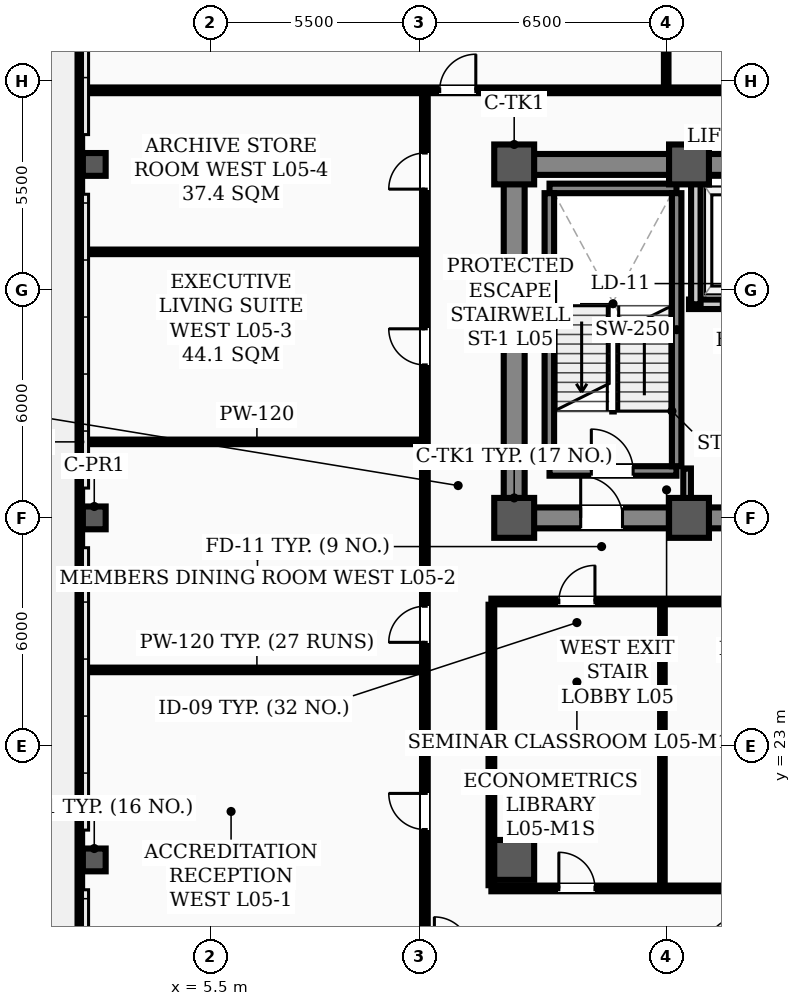
"""IFC4 building model, lengths in metres.
Left out: names, types, materials, properties, quantities, classifications, styles, units other than length and angle.
Written with IfcOpenShell. Run it as: python <this file> out.ifc"""

import sys

from ifc_helpers import new_model, si_unit, direction, frame, frame_2d, origin, origin_2d, place, context, subcontext, project, spatial, rectangle, hollow_rectangle, extrude, element, fill, save


model = new_model("IFC4")
c1 = context("Model", 3, precision=1e-05, world=origin(), true_north=direction((0.0, 1.0)))
c2 = subcontext(c1, "Body", "Model", "MODEL_VIEW")
j1 = project(units=[si_unit("LENGTHUNIT", "METRE"), si_unit("PLANEANGLEUNIT", "RADIAN")], contexts=[c1])
p1 = place(None, origin())
s1 = spatial("IfcSite", under=j1, at=p1, CompositionType="ELEMENT")
p2 = place(p1, origin())
s2 = spatial("IfcBuilding", under=s1, at=p2, CompositionType="ELEMENT")
p3 = place(p2, frame((0.0, 0.0, 22.0)))
s3 = spatial("IfcBuildingStorey", under=s2, at=p3, CompositionType="ELEMENT", Elevation=22.0)
for number, where, z_axis, x_axis in (
    (1, (13.5, 29.0, 0.0), (0.0, 0.0, 1.0), (1.0, 0.0, 0.0)),
    (2, (13.5, 38.3, 0.0), (0.0, 0.0, 1.0), (1.0, 0.0, 0.0)),
    (3, (18.1, 29.0, 0.0), (0.0, 0.0, 1.0), (1.0, 0.0, 0.0)),
    (4, (18.1, 38.3, 0.0), (0.0, 0.0, 1.0), (1.0, 0.0, 0.0)),
    (5, (13.5, 20.0, 0.0), (0.0, 0.0, 1.0), (1.0, 0.0, 0.0)),
):
    element("IfcColumn", number, at=place(p3, frame(where, z_axis=z_axis, x_axis=x_axis)), inside=s3, PredefinedType="COLUMN", context=c2, shape_type="SweptSolid", body=[
        extrude(hollow_rectangle(XDim=1.05, YDim=1.05, WallThickness=0.038, InnerFilletRadius=0.019, OuterFilletRadius=0.057, at=origin_2d()), origin(), (0.0, 0.0, 1.0), 4.5),
    ])
for number, where, z_axis, x_axis in (
    (6, (2.45, 20.0, 0.0), (0.0, 0.0, 1.0), (1.0, 0.0, 0.0)),
    (7, (2.45, 29.0, 0.0), (0.0, 0.0, 1.0), (1.0, 0.0, 0.0)),
    (8, (2.45, 38.3, 0.0), (0.0, 0.0, 1.0), (1.0, 0.0, 0.0)),
):
    element("IfcColumn", number, at=place(p3, frame(where, z_axis=z_axis, x_axis=x_axis)), inside=s3, PredefinedType="COLUMN", context=c2, shape_type="SweptSolid", body=[
        extrude(hollow_rectangle(XDim=0.6, YDim=0.6, WallThickness=0.026, InnerFilletRadius=0.013, OuterFilletRadius=0.039, at=origin_2d()), origin(), (0.0, 0.0, 1.0), 4.5),
    ])
p4 = place(p3, frame((2.07, 17.45, 0.0), z_axis=(0.0, 0.0, 1.0), x_axis=(0.0, 1.0, 0.0)))
e9 = element("IfcWall", 9, at=p4, inside=s3, PredefinedType="PARAPET", context=c2, shape_type="SweptSolid", body=[
    extrude(rectangle(XDim=27.1, YDim=0.12, at=frame_2d((13.55, 0.0))), origin(), (0.0, 0.0, 1.0), 1.2),
])
p5 = place(p3, frame((13.5, 29.0, 0.0), z_axis=(0.0, 0.0, 1.0), x_axis=(1.0, 0.0, 0.0)))
e10 = element("IfcWall", 10, at=p5, inside=s3, PredefinedType="SHEAR", context=c2, shape_type="SweptSolid", body=[
    extrude(rectangle(XDim=30.5, YDim=0.55, at=frame_2d((15.25, 0.0))), origin(), (0.0, 0.0, 1.0), 4.32),
])
p6 = place(p5, frame((1.75, 0.0, 0.0)))
e11 = element("IfcOpeningElement", 11, at=p6, cuts=e10, PredefinedType="OPENING", context=c2, shape_type="SweptSolid", body=[
    extrude(rectangle(XDim=1.1, YDim=2.08, at=frame_2d((0.55, 1.04))), frame((0.0, 0.285, 0.0), z_axis=(0.0, -1.0, 0.0), x_axis=(1.0, 0.0, 0.0)), (0.0, 0.0, 1.0), 0.57),
])
p7 = place(p5, frame((26.7, 0.0, 0.0)))
e12 = element("IfcOpeningElement", 12, at=p7, cuts=e10, PredefinedType="OPENING", context=c2, shape_type="SweptSolid", body=[
    extrude(rectangle(XDim=1.1, YDim=2.08, at=frame_2d((0.55, 1.04))), frame((0.0, 0.285, 0.0), z_axis=(0.0, -1.0, 0.0), x_axis=(1.0, 0.0, 0.0)), (0.0, 0.0, 1.0), 0.57),
])
p8 = place(p5, frame((6.8, 0.0, 0.0)))
e13 = element("IfcOpeningElement", 13, at=p8, cuts=e10, PredefinedType="OPENING", context=c2, shape_type="SweptSolid", body=[
    extrude(rectangle(XDim=1.1, YDim=2.08, at=frame_2d((0.55, 1.04))), frame((0.0, 0.285, 0.0), z_axis=(0.0, -1.0, 0.0), x_axis=(1.0, 0.0, 0.0)), (0.0, 0.0, 1.0), 0.57),
])
p9 = place(p5, frame((13.2, 0.0, 0.0)))
e14 = element("IfcOpeningElement", 14, at=p9, cuts=e10, PredefinedType="OPENING", context=c2, shape_type="SweptSolid", body=[
    extrude(rectangle(XDim=1.6, YDim=2.08, at=frame_2d((0.8, 1.04))), frame((0.0, 0.285, 0.0), z_axis=(0.0, -1.0, 0.0), x_axis=(1.0, 0.0, 0.0)), (0.0, 0.0, 1.0), 0.57),
])
p10 = place(p5, frame((19.5, 0.0, 0.0)))
e15 = element("IfcOpeningElement", 15, at=p10, cuts=e10, PredefinedType="OPENING", context=c2, shape_type="SweptSolid", body=[
    extrude(rectangle(XDim=0.9, YDim=2.08, at=frame_2d((0.45, 1.04))), frame((0.0, 0.285, 0.0), z_axis=(0.0, -1.0, 0.0), x_axis=(1.0, 0.0, 0.0)), (0.0, 0.0, 1.0), 0.57),
])
p11 = place(p5, frame((21.55, 0.0, 0.0)))
e16 = element("IfcOpeningElement", 16, at=p11, cuts=e10, PredefinedType="OPENING", context=c2, shape_type="SweptSolid", body=[
    extrude(rectangle(XDim=0.9, YDim=2.08, at=frame_2d((0.45, 1.04))), frame((0.0, 0.285, 0.0), z_axis=(0.0, -1.0, 0.0), x_axis=(1.0, 0.0, 0.0)), (0.0, 0.0, 1.0), 0.57),
])
p12 = place(p3, frame((13.5, 38.3, 0.0), z_axis=(0.0, 0.0, 1.0), x_axis=(1.0, 0.0, 0.0)))
e17 = element("IfcWall", 17, at=p12, inside=s3, PredefinedType="SHEAR", context=c2, shape_type="SweptSolid", body=[
    extrude(rectangle(XDim=30.5, YDim=0.55, at=frame_2d((15.25, 0.0))), origin(), (0.0, 0.0, 1.0), 4.32),
])
p13 = place(p3, frame((13.5, 29.35, 0.0), z_axis=(0.0, 0.0, 1.0), x_axis=(0.0, 1.0, 0.0)))
e18 = element("IfcWall", 18, at=p13, inside=s3, PredefinedType="SHEAR", context=c2, shape_type="SweptSolid", body=[
    extrude(rectangle(XDim=8.6, YDim=0.55, at=frame_2d((4.3, 0.0))), origin(), (0.0, 0.0, 1.0), 4.32),
])
p14 = place(p3, frame((14.43, 30.235, 0.0), z_axis=(0.0, 0.0, 1.0), x_axis=(1.0, 0.0, 0.0)))
e19 = element("IfcWall", 19, at=p14, inside=s3, PredefinedType="STANDARD", context=c2, shape_type="SweptSolid", body=[
    extrude(rectangle(XDim=3.34, YDim=0.25, at=frame_2d((1.67, 0.0))), origin(), (0.0, 0.0, 1.0), 4.32),
])
p15 = place(p14, frame((1.1, 0.0, 0.0)))
e20 = element("IfcOpeningElement", 20, at=p15, cuts=e19, PredefinedType="OPENING", context=c2, shape_type="SweptSolid", body=[
    extrude(rectangle(XDim=1.1, YDim=2.08, at=frame_2d((0.55, 1.04))), frame((0.0, 0.135, 0.0), z_axis=(0.0, -1.0, 0.0), x_axis=(1.0, 0.0, 0.0)), (0.0, 0.0, 1.0), 0.27),
])
p16 = place(p3, frame((14.43, 37.669, 0.0), z_axis=(0.0, 0.0, 1.0), x_axis=(1.0, 0.0, 0.0)))
e21 = element("IfcWall", 21, at=p16, inside=s3, PredefinedType="STANDARD", context=c2, shape_type="SweptSolid", body=[
    extrude(rectangle(XDim=3.34, YDim=0.25, at=frame_2d((1.67, 0.0))), origin(), (0.0, 0.0, 1.0), 4.32),
])
for number, where, z_axis, x_axis in (
    (22, (14.425, 30.36, 0.0), (0.0, 0.0, 1.0), (0.0, 1.0, 0.0)),
    (23, (17.775, 30.36, 0.0), (0.0, 0.0, 1.0), (0.0, 1.0, 0.0)),
):
    element("IfcWall", number, at=place(p3, frame(where, z_axis=z_axis, x_axis=x_axis)), inside=s3, PredefinedType="STANDARD", context=c2, shape_type="SweptSolid", body=[
        extrude(rectangle(XDim=7.184, YDim=0.25, at=frame_2d((3.592, 0.0))), origin(), (0.0, 0.0, 1.0), 4.32),
    ])
p17 = place(p3, frame((18.1, 34.62, 0.0), z_axis=(0.0, 0.0, 1.0), x_axis=(1.0, 0.0, 0.0)))
e24 = element("IfcWall", 24, at=p17, inside=s3, PredefinedType="STANDARD", context=c2, shape_type="SweptSolid", body=[
    extrude(rectangle(XDim=5.35, YDim=0.25, at=frame_2d((2.675, 0.0))), origin(), (0.0, 0.0, 1.0), 4.32),
])
p18 = place(p17, frame((0.85, 0.0, 0.0)))
e25 = element("IfcOpeningElement", 25, at=p18, cuts=e24, PredefinedType="OPENING", context=c2, shape_type="SweptSolid", body=[
    extrude(rectangle(XDim=1.1, YDim=2.08, at=frame_2d((0.55, 1.04))), frame((0.0, 0.135, 0.0), z_axis=(0.0, -1.0, 0.0), x_axis=(1.0, 0.0, 0.0)), (0.0, 0.0, 1.0), 0.27),
])
p19 = place(p17, frame((3.45, 0.0, 0.0)))
e26 = element("IfcOpeningElement", 26, at=p19, cuts=e24, PredefinedType="OPENING", context=c2, shape_type="SweptSolid", body=[
    extrude(rectangle(XDim=1.1, YDim=2.08, at=frame_2d((0.55, 1.04))), frame((0.0, 0.135, 0.0), z_axis=(0.0, -1.0, 0.0), x_axis=(1.0, 0.0, 0.0)), (0.0, 0.0, 1.0), 0.27),
])
p20 = place(p3, frame((18.28, 34.62, 0.0), z_axis=(0.0, 0.0, 1.0), x_axis=(0.0, 1.0, 0.0)))
e27 = element("IfcWall", 27, at=p20, inside=s3, PredefinedType="STANDARD", context=c2, shape_type="SweptSolid", body=[
    extrude(rectangle(XDim=3.33, YDim=0.25, at=frame_2d((1.665, 0.0))), origin(), (0.0, 0.0, 1.0), 3.9),
])
p21 = place(p3, frame((12.9, 26.8, 0.0), z_axis=(0.0, 0.0, 1.0), x_axis=(1.0, 0.0, 0.0)))
e28 = element("IfcWall", 28, at=p21, inside=s3, PredefinedType="PARTITIONING", context=c2, shape_type="SweptSolid", body=[
    extrude(rectangle(XDim=31.7, YDim=0.15, at=frame_2d((15.85, 0.0))), origin(), (0.0, 0.0, 1.0), 3.7),
])
p22 = place(p21, frame((13.6, 0.0, 0.0)))
e29 = element("IfcOpeningElement", 29, at=p22, cuts=e28, PredefinedType="OPENING", context=c2, shape_type="SweptSolid", body=[
    extrude(rectangle(XDim=1.6, YDim=2.08, at=frame_2d((0.8, 1.04))), frame((0.0, 0.085, 0.0), z_axis=(0.0, -1.0, 0.0), x_axis=(1.0, 0.0, 0.0)), (0.0, 0.0, 1.0), 0.17),
])
p23 = place(p21, frame((1.775, 0.0, 0.0)))
e30 = element("IfcOpeningElement", 30, at=p23, cuts=e28, PredefinedType="OPENING", context=c2, shape_type="SweptSolid", body=[
    extrude(rectangle(XDim=0.95, YDim=2.08, at=frame_2d((0.475, 1.04))), frame((0.0, 0.085, 0.0), z_axis=(0.0, -1.0, 0.0), x_axis=(1.0, 0.0, 0.0)), (0.0, 0.0, 1.0), 0.17),
])
p24 = place(p21, frame((6.225, 0.0, 0.0)))
e31 = element("IfcOpeningElement", 31, at=p24, cuts=e28, PredefinedType="OPENING", context=c2, shape_type="SweptSolid", body=[
    extrude(rectangle(XDim=0.95, YDim=2.08, at=frame_2d((0.475, 1.04))), frame((0.0, 0.085, 0.0), z_axis=(0.0, -1.0, 0.0), x_axis=(1.0, 0.0, 0.0)), (0.0, 0.0, 1.0), 0.17),
])
p25 = place(p21, frame((10.625, 0.0, 0.0)))
e32 = element("IfcOpeningElement", 32, at=p25, cuts=e28, PredefinedType="OPENING", context=c2, shape_type="SweptSolid", body=[
    extrude(rectangle(XDim=0.95, YDim=2.08, at=frame_2d((0.475, 1.04))), frame((0.0, 0.085, 0.0), z_axis=(0.0, -1.0, 0.0), x_axis=(1.0, 0.0, 0.0)), (0.0, 0.0, 1.0), 0.17),
])
p26 = place(p21, frame((16.075, 0.0, 0.0)))
e33 = element("IfcOpeningElement", 33, at=p26, cuts=e28, PredefinedType="OPENING", context=c2, shape_type="SweptSolid", body=[
    extrude(rectangle(XDim=0.95, YDim=2.08, at=frame_2d((0.475, 1.04))), frame((0.0, 0.085, 0.0), z_axis=(0.0, -1.0, 0.0), x_axis=(1.0, 0.0, 0.0)), (0.0, 0.0, 1.0), 0.17),
])
p27 = place(p21, frame((21.925, 0.0, 0.0)))
e34 = element("IfcOpeningElement", 34, at=p27, cuts=e28, PredefinedType="OPENING", context=c2, shape_type="SweptSolid", body=[
    extrude(rectangle(XDim=0.95, YDim=2.08, at=frame_2d((0.475, 1.04))), frame((0.0, 0.085, 0.0), z_axis=(0.0, -1.0, 0.0), x_axis=(1.0, 0.0, 0.0)), (0.0, 0.0, 1.0), 0.17),
])
p28 = place(p21, frame((28.625, 0.0, 0.0)))
e35 = element("IfcOpeningElement", 35, at=p28, cuts=e28, PredefinedType="OPENING", context=c2, shape_type="SweptSolid", body=[
    extrude(rectangle(XDim=0.95, YDim=2.08, at=frame_2d((0.475, 1.04))), frame((0.0, 0.085, 0.0), z_axis=(0.0, -1.0, 0.0), x_axis=(1.0, 0.0, 0.0)), (0.0, 0.0, 1.0), 0.17),
])
p29 = place(p3, frame((12.9, 19.25, 0.0), z_axis=(0.0, 0.0, 1.0), x_axis=(1.0, 0.0, 0.0)))
e36 = element("IfcWall", 36, at=p29, inside=s3, PredefinedType="PARTITIONING", context=c2, shape_type="SweptSolid", body=[
    extrude(rectangle(XDim=13.3, YDim=0.15, at=frame_2d((6.65, 0.0))), origin(), (0.0, 0.0, 1.0), 3.7),
])
p30 = place(p29, frame((1.775, 0.0, 0.0)))
e37 = element("IfcOpeningElement", 37, at=p30, cuts=e36, PredefinedType="OPENING", context=c2, shape_type="SweptSolid", body=[
    extrude(rectangle(XDim=0.95, YDim=2.08, at=frame_2d((0.475, 1.04))), frame((0.0, 0.085, 0.0), z_axis=(0.0, -1.0, 0.0), x_axis=(1.0, 0.0, 0.0)), (0.0, 0.0, 1.0), 0.17),
])
p31 = place(p29, frame((6.225, 0.0, 0.0)))
e38 = element("IfcOpeningElement", 38, at=p31, cuts=e36, PredefinedType="OPENING", context=c2, shape_type="SweptSolid", body=[
    extrude(rectangle(XDim=0.95, YDim=2.08, at=frame_2d((0.475, 1.04))), frame((0.0, 0.085, 0.0), z_axis=(0.0, -1.0, 0.0), x_axis=(1.0, 0.0, 0.0)), (0.0, 0.0, 1.0), 0.17),
])
p32 = place(p29, frame((12.175, 0.0, 0.0)))
e39 = element("IfcOpeningElement", 39, at=p32, cuts=e36, PredefinedType="OPENING", context=c2, shape_type="SweptSolid", body=[
    extrude(rectangle(XDim=0.95, YDim=2.08, at=frame_2d((0.475, 1.04))), frame((0.0, 0.085, 0.0), z_axis=(0.0, -1.0, 0.0), x_axis=(1.0, 0.0, 0.0)), (0.0, 0.0, 1.0), 0.17),
])
p33 = place(p3, frame((12.9, 23.0, 0.0), z_axis=(0.0, 0.0, 1.0), x_axis=(1.0, 0.0, 0.0)))
e40 = element("IfcWall", 40, at=p33, inside=s3, PredefinedType="PARTITIONING", context=c2, shape_type="SweptSolid", body=[
    extrude(rectangle(XDim=4.5, YDim=0.12, at=frame_2d((2.25, 0.0))), origin(), (0.0, 0.0, 1.0), 3.7),
])
p34 = place(p3, frame((17.4, 23.0, 0.0), z_axis=(0.0, 0.0, 1.0), x_axis=(1.0, 0.0, 0.0)))
e41 = element("IfcWall", 41, at=p34, inside=s3, PredefinedType="PARTITIONING", context=c2, shape_type="SweptSolid", body=[
    extrude(rectangle(XDim=4.4, YDim=0.12, at=frame_2d((2.2, 0.0))), origin(), (0.0, 0.0, 1.0), 3.9),
])
for number, where, z_axis, x_axis in (
    (42, (2.31, 25.0, 0.0), (0.0, 0.0, 1.0), (1.0, 0.0, 0.0)),
    (43, (2.31, 31.0, 0.0), (0.0, 0.0, 1.0), (1.0, 0.0, 0.0)),
    (44, (2.31, 36.0, 0.0), (0.0, 0.0, 1.0), (1.0, 0.0, 0.0)),
):
    element("IfcWall", number, at=place(p3, frame(where, z_axis=z_axis, x_axis=x_axis)), inside=s3, PredefinedType="PARTITIONING", context=c2, shape_type="SweptSolid", body=[
        extrude(rectangle(XDim=8.84, YDim=0.12, at=frame_2d((4.42, 0.0))), origin(), (0.0, 0.0, 1.0), 3.812),
    ])
p35 = place(p3, frame((2.31, 40.25, 0.0), z_axis=(0.0, 0.0, 1.0), x_axis=(1.0, 0.0, 0.0)))
e45 = element("IfcWall", 45, at=p35, inside=s3, PredefinedType="PARTITIONING", context=c2, shape_type="SweptSolid", body=[
    extrude(rectangle(XDim=49.38, YDim=0.15, at=frame_2d((24.69, 0.0))), origin(), (0.0, 0.0, 1.0), 3.7),
])
p36 = place(p35, frame((9.23, 0.0, 0.0)))
e46 = element("IfcOpeningElement", 46, at=p36, cuts=e45, PredefinedType="OPENING", context=c2, shape_type="SweptSolid", body=[
    extrude(rectangle(XDim=0.95, YDim=2.08, at=frame_2d((0.475, 1.04))), frame((0.0, 0.085, 0.0), z_axis=(0.0, -1.0, 0.0), x_axis=(1.0, 0.0, 0.0)), (0.0, 0.0, 1.0), 0.17),
])
p37 = place(p35, frame((18.715, 0.0, 0.0)))
e47 = element("IfcOpeningElement", 47, at=p37, cuts=e45, PredefinedType="OPENING", context=c2, shape_type="SweptSolid", body=[
    extrude(rectangle(XDim=0.95, YDim=2.08, at=frame_2d((0.475, 1.04))), frame((0.0, 0.085, 0.0), z_axis=(0.0, -1.0, 0.0), x_axis=(1.0, 0.0, 0.0)), (0.0, 0.0, 1.0), 0.17),
])
p38 = place(p35, frame((26.715, 0.0, 0.0)))
e48 = element("IfcOpeningElement", 48, at=p38, cuts=e45, PredefinedType="OPENING", context=c2, shape_type="SweptSolid", body=[
    extrude(rectangle(XDim=0.95, YDim=2.08, at=frame_2d((0.475, 1.04))), frame((0.0, 0.085, 0.0), z_axis=(0.0, -1.0, 0.0), x_axis=(1.0, 0.0, 0.0)), (0.0, 0.0, 1.0), 0.17),
])
p39 = place(p35, frame((31.765, 0.0, 0.0)))
e49 = element("IfcOpeningElement", 49, at=p39, cuts=e45, PredefinedType="OPENING", context=c2, shape_type="SweptSolid", body=[
    extrude(rectangle(XDim=0.95, YDim=2.08, at=frame_2d((0.475, 1.04))), frame((0.0, 0.085, 0.0), z_axis=(0.0, -1.0, 0.0), x_axis=(1.0, 0.0, 0.0)), (0.0, 0.0, 1.0), 0.17),
])
p40 = place(p35, frame((42.7, 0.0, 0.0)))
e50 = element("IfcOpeningElement", 50, at=p40, cuts=e45, PredefinedType="OPENING", context=c2, shape_type="SweptSolid", body=[
    extrude(rectangle(XDim=0.95, YDim=2.08, at=frame_2d((0.475, 1.04))), frame((0.0, 0.085, 0.0), z_axis=(0.0, -1.0, 0.0), x_axis=(1.0, 0.0, 0.0)), (0.0, 0.0, 1.0), 0.17),
])
p41 = place(p3, frame((18.05, 29.285, 0.0), z_axis=(0.0, 0.0, 1.0), x_axis=(0.0, 1.0, 0.0)))
e51 = element("IfcWall", 51, at=p41, inside=s3, PredefinedType="STANDARD", context=c2, shape_type="SweptSolid", body=[
    extrude(rectangle(XDim=1.015, YDim=0.2, at=frame_2d((0.508, 0.0))), origin(), (0.0, 0.0, 1.0), 3.9),
])
p42 = place(p3, frame((11.15, 17.635, 0.0), z_axis=(0.0, 0.0, 1.0), x_axis=(0.0, 1.0, 0.0)))
e52 = element("IfcWall", 52, at=p42, inside=s3, PredefinedType="PARTITIONING", context=c2, shape_type="SweptSolid", body=[
    extrude(rectangle(XDim=22.53, YDim=0.15, at=frame_2d((11.265, 0.0))), origin(), (0.0, 0.0, 1.0), 3.6),
])
p43 = place(p42, frame((3.165, 0.0, 0.0)))
e53 = element("IfcOpeningElement", 53, at=p43, cuts=e52, PredefinedType="OPENING", context=c2, shape_type="SweptSolid", body=[
    extrude(rectangle(XDim=0.95, YDim=2.08, at=frame_2d((0.475, 1.04))), frame((0.0, 0.085, 0.0), z_axis=(0.0, -1.0, 0.0), x_axis=(1.0, 0.0, 0.0)), (0.0, 0.0, 1.0), 0.17),
])
p44 = place(p42, frame((8.09, 0.0, 0.0)))
e54 = element("IfcOpeningElement", 54, at=p44, cuts=e52, PredefinedType="OPENING", context=c2, shape_type="SweptSolid", body=[
    extrude(rectangle(XDim=0.95, YDim=2.08, at=frame_2d((0.475, 1.04))), frame((0.0, 0.085, 0.0), z_axis=(0.0, -1.0, 0.0), x_axis=(1.0, 0.0, 0.0)), (0.0, 0.0, 1.0), 0.17),
])
p45 = place(p42, frame((15.39, 0.0, 0.0)))
e55 = element("IfcOpeningElement", 55, at=p45, cuts=e52, PredefinedType="OPENING", context=c2, shape_type="SweptSolid", body=[
    extrude(rectangle(XDim=0.95, YDim=2.08, at=frame_2d((0.475, 1.04))), frame((0.0, 0.085, 0.0), z_axis=(0.0, -1.0, 0.0), x_axis=(1.0, 0.0, 0.0)), (0.0, 0.0, 1.0), 0.17),
])
p46 = place(p42, frame((20.015, 0.0, 0.0)))
e56 = element("IfcOpeningElement", 56, at=p46, cuts=e52, PredefinedType="OPENING", context=c2, shape_type="SweptSolid", body=[
    extrude(rectangle(XDim=0.95, YDim=2.08, at=frame_2d((0.475, 1.04))), frame((0.0, 0.085, 0.0), z_axis=(0.0, -1.0, 0.0), x_axis=(1.0, 0.0, 0.0)), (0.0, 0.0, 1.0), 0.17),
])
p47 = place(p3, frame((12.9, 19.335, 0.0), z_axis=(0.0, 0.0, 1.0), x_axis=(0.0, 1.0, 0.0)))
e57 = element("IfcWall", 57, at=p47, inside=s3, PredefinedType="PARTITIONING", context=c2, shape_type="SweptSolid", body=[
    extrude(rectangle(XDim=7.38, YDim=0.15, at=frame_2d((3.69, 0.0))), origin(), (0.0, 0.0, 1.0), 3.6),
])
p48 = place(p3, frame((17.4, 19.335, 0.0), z_axis=(0.0, 0.0, 1.0), x_axis=(0.0, 1.0, 0.0)))
e58 = element("IfcWall", 58, at=p48, inside=s3, PredefinedType="PARTITIONING", context=c2, shape_type="SweptSolid", body=[
    extrude(rectangle(XDim=7.38, YDim=0.12, at=frame_2d((3.69, 0.0))), origin(), (0.0, 0.0, 1.0), 3.6),
])
p49 = place(p3, frame((17.5, 40.335, 0.0), z_axis=(0.0, 0.0, 1.0), x_axis=(0.0, 1.0, 0.0)))
e59 = element("IfcWall", 59, at=p49, inside=s3, PredefinedType="PARTITIONING", context=c2, shape_type="SweptSolid", body=[
    extrude(rectangle(XDim=6.355, YDim=0.12, at=frame_2d((3.177, 0.0))), origin(), (0.0, 0.0, 1.0), 3.812),
])
p50 = place(p15, origin())
e60 = element("IfcDoor", 60, at=p50, inside=s3, OperationType="SINGLE_SWING_LEFT", PredefinedType="DOOR", context=c2, shape_type="SweptSolid", body=[
    extrude(rectangle(XDim=1.1, YDim=2.08, at=frame_2d((0.55, 1.04))), frame((0.0, 0.025, 0.0), z_axis=(0.0, -1.0, 0.0), x_axis=(1.0, 0.0, 0.0)), (0.0, 0.0, 1.0), 0.05),
])
fill(e20, e60)
p51 = place(p6, origin())
e61 = element("IfcDoor", 61, at=p51, inside=s3, OperationType="SINGLE_SWING_LEFT", PredefinedType="DOOR", context=c2, shape_type="SweptSolid", body=[
    extrude(rectangle(XDim=1.1, YDim=2.08, at=frame_2d((0.55, 1.04))), frame((0.0, 0.025, 0.0), z_axis=(0.0, -1.0, 0.0), x_axis=(1.0, 0.0, 0.0)), (0.0, 0.0, 1.0), 0.05),
])
fill(e11, e61)
p52 = place(p23, origin())
e62 = element("IfcDoor", 62, at=p52, inside=s3, OperationType="SINGLE_SWING_RIGHT", PredefinedType="DOOR", context=c2, shape_type="SweptSolid", body=[
    extrude(rectangle(XDim=0.95, YDim=2.08, at=frame_2d((0.475, 1.04))), frame((0.0, 0.025, 0.0), z_axis=(0.0, -1.0, 0.0), x_axis=(1.0, 0.0, 0.0)), (0.0, 0.0, 1.0), 0.05),
])
fill(e30, e62)
p53 = place(p30, origin())
e63 = element("IfcDoor", 63, at=p53, inside=s3, OperationType="SINGLE_SWING_LEFT", PredefinedType="DOOR", context=c2, shape_type="SweptSolid", body=[
    extrude(rectangle(XDim=0.95, YDim=2.08, at=frame_2d((0.475, 1.04))), frame((0.0, 0.025, 0.0), z_axis=(0.0, -1.0, 0.0), x_axis=(1.0, 0.0, 0.0)), (0.0, 0.0, 1.0), 0.05),
])
fill(e37, e63)
p54 = place(p43, origin())
e64 = element("IfcDoor", 64, at=p54, inside=s3, OperationType="SINGLE_SWING_RIGHT", PredefinedType="DOOR", context=c2, shape_type="SweptSolid", body=[
    extrude(rectangle(XDim=0.95, YDim=2.08, at=frame_2d((0.475, 1.04))), frame((0.0, 0.025, 0.0), z_axis=(0.0, -1.0, 0.0), x_axis=(1.0, 0.0, 0.0)), (0.0, 0.0, 1.0), 0.05),
])
fill(e53, e64)
p55 = place(p44, origin())
e65 = element("IfcDoor", 65, at=p55, inside=s3, OperationType="SINGLE_SWING_LEFT", PredefinedType="DOOR", context=c2, shape_type="SweptSolid", body=[
    extrude(rectangle(XDim=0.95, YDim=2.08, at=frame_2d((0.475, 1.04))), frame((0.0, 0.025, 0.0), z_axis=(0.0, -1.0, 0.0), x_axis=(1.0, 0.0, 0.0)), (0.0, 0.0, 1.0), 0.05),
])
fill(e54, e65)
p56 = place(p45, origin())
e66 = element("IfcDoor", 66, at=p56, inside=s3, OperationType="SINGLE_SWING_RIGHT", PredefinedType="DOOR", context=c2, shape_type="SweptSolid", body=[
    extrude(rectangle(XDim=0.95, YDim=2.08, at=frame_2d((0.475, 1.04))), frame((0.0, 0.025, 0.0), z_axis=(0.0, -1.0, 0.0), x_axis=(1.0, 0.0, 0.0)), (0.0, 0.0, 1.0), 0.05),
])
fill(e55, e66)
p57 = place(p46, origin())
e67 = element("IfcDoor", 67, at=p57, inside=s3, OperationType="SINGLE_SWING_LEFT", PredefinedType="DOOR", context=c2, shape_type="SweptSolid", body=[
    extrude(rectangle(XDim=0.95, YDim=2.08, at=frame_2d((0.475, 1.04))), frame((0.0, 0.025, 0.0), z_axis=(0.0, -1.0, 0.0), x_axis=(1.0, 0.0, 0.0)), (0.0, 0.0, 1.0), 0.05),
])
fill(e56, e67)
p58 = place(p36, origin())
e68 = element("IfcDoor", 68, at=p58, inside=s3, OperationType="SINGLE_SWING_RIGHT", PredefinedType="DOOR", context=c2, shape_type="SweptSolid", body=[
    extrude(rectangle(XDim=0.95, YDim=2.08, at=frame_2d((0.475, 1.04))), frame((0.0, 0.025, 0.0), z_axis=(0.0, -1.0, 0.0), x_axis=(1.0, 0.0, 0.0)), (0.0, 0.0, 1.0), 0.05),
])
fill(e46, e68)
save(model, sys.argv[1])
